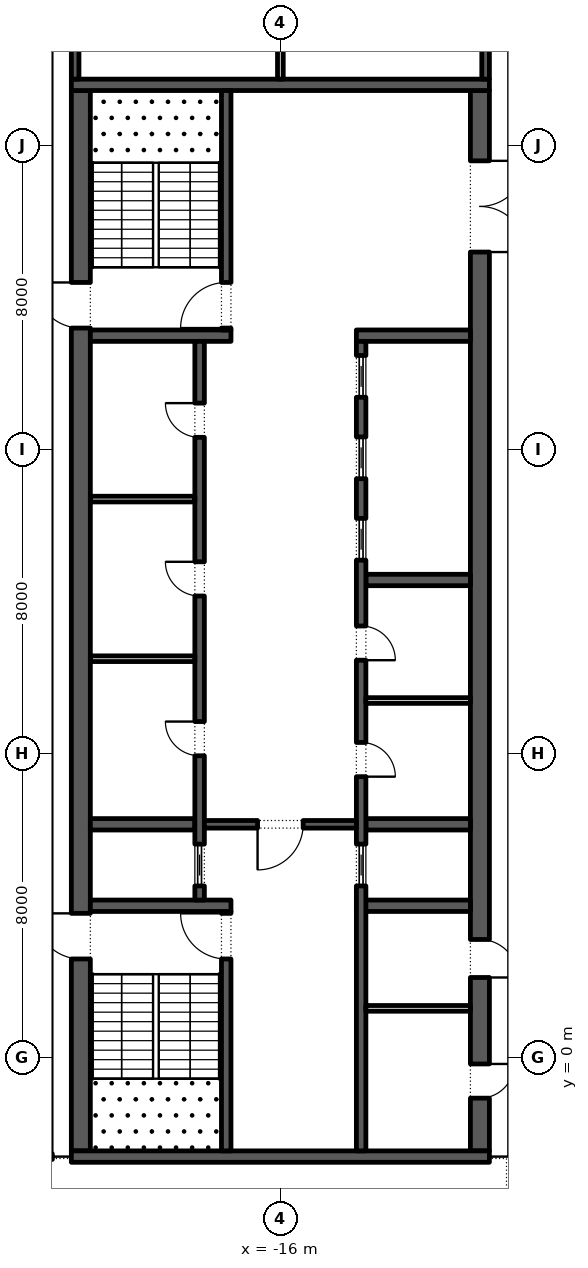
"""IFC4 building model, lengths in metres.
Left out: names, types, materials, properties, quantities, classifications, styles, units other than length and angle.
Written with IfcOpenShell. Run it as: python <this file> out.ifc"""

import sys

from ifc_helpers import new_model, si_unit, direction, frame, frame_2d, origin, place, context, subcontext, project, spatial, rectangle, extrude, element, fill, save


model = new_model("IFC4")
c1 = context("Model", 3, precision=1e-05, world=origin(), true_north=direction((0.0, 1.0)))
c2 = subcontext(c1, "Body", "Model", "MODEL_VIEW")
j1 = project(units=[si_unit("LENGTHUNIT", "METRE"), si_unit("PLANEANGLEUNIT", "RADIAN")], contexts=[c1])
p1 = place(None, origin())
s1 = spatial("IfcSite", under=j1, at=p1, CompositionType="ELEMENT")
p2 = place(p1, origin())
s2 = spatial("IfcBuilding", under=s1, at=p2, CompositionType="ELEMENT")
p3 = place(p2, frame((0.0, 0.0, 325.8)))
s3 = spatial("IfcBuildingStorey", under=s2, at=p3, CompositionType="ELEMENT", Elevation=325.8)
p4 = place(p3, frame((-21.25, -2.45, 0.0), z_axis=(0.0, 0.0, 1.0), x_axis=(0.0, 1.0, 0.0)))
e1 = element("IfcWall", 1, at=p4, inside=s3, PredefinedType="SHEAR", context=c2, shape_type="SweptSolid", body=[
    extrude(rectangle(XDim=27.9, YDim=0.5, at=frame_2d((13.95, 0.0))), origin(), (0.0, 0.0, 1.0), 4.0),
])
p5 = place(p4, frame((5.05, 0.0, 0.0)))
e2 = element("IfcOpeningElement", 2, at=p5, cuts=e1, PredefinedType="OPENING", context=c2, shape_type="SweptSolid", body=[
    extrude(rectangle(XDim=1.2, YDim=2.1, at=frame_2d((0.6, 1.05))), frame((0.0, 0.26, 0.0), z_axis=(0.0, -1.0, 0.0), x_axis=(1.0, 0.0, 0.0)), (0.0, 0.0, 1.0), 0.52),
])
p6 = place(p4, frame((21.65, 0.0, 0.0)))
e3 = element("IfcOpeningElement", 3, at=p6, cuts=e1, PredefinedType="OPENING", context=c2, shape_type="SweptSolid", body=[
    extrude(rectangle(XDim=1.2, YDim=2.1, at=frame_2d((0.6, 1.05))), frame((0.0, 0.26, 0.0), z_axis=(0.0, -1.0, 0.0), x_axis=(1.0, 0.0, 0.0)), (0.0, 0.0, 1.0), 0.52),
])
p7 = place(p3, frame((-10.75, -2.45, 0.0), z_axis=(0.0, 0.0, 1.0), x_axis=(0.0, 1.0, 0.0)))
e4 = element("IfcWall", 4, at=p7, inside=s3, PredefinedType="SHEAR", context=c2, shape_type="SweptSolid", body=[
    extrude(rectangle(XDim=27.9, YDim=0.5, at=frame_2d((13.95, 0.0))), origin(), (0.0, 0.0, 1.0), 4.0),
])
p8 = place(p7, frame((23.65, 0.0, 0.0)))
e5 = element("IfcOpeningElement", 5, at=p8, cuts=e4, PredefinedType="OPENING", context=c2, shape_type="SweptSolid", body=[
    extrude(rectangle(XDim=2.4, YDim=2.1, at=frame_2d((1.2, 1.05))), frame((0.0, 0.26, 0.0), z_axis=(0.0, -1.0, 0.0), x_axis=(1.0, 0.0, 0.0)), (0.0, 0.0, 1.0), 0.52),
])
p9 = place(p7, frame((1.387, 0.0, 0.0)))
e6 = element("IfcOpeningElement", 6, at=p9, cuts=e4, PredefinedType="OPENING", context=c2, shape_type="SweptSolid", body=[
    extrude(rectangle(XDim=0.9, YDim=2.1, at=frame_2d((0.45, 1.05))), frame((0.0, 0.26, 0.0), z_axis=(0.0, -1.0, 0.0), x_axis=(1.0, 0.0, 0.0)), (0.0, 0.0, 1.0), 0.52),
])
p10 = place(p7, frame((4.562, 0.0, 0.0)))
e7 = element("IfcOpeningElement", 7, at=p10, cuts=e4, PredefinedType="OPENING", context=c2, shape_type="SweptSolid", body=[
    extrude(rectangle(XDim=1.0, YDim=2.1, at=frame_2d((0.5, 1.05))), frame((0.0, 0.26, 0.0), z_axis=(0.0, -1.0, 0.0), x_axis=(1.0, 0.0, 0.0)), (0.0, 0.0, 1.0), 0.52),
])
for number, where, z_axis, x_axis in (
    (8, (-21.5, -2.6, 0.0), (0.0, 0.0, 1.0), (1.0, 0.0, 0.0)),
    (9, (-21.5, 25.6, 0.0), (0.0, 0.0, 1.0), (1.0, 0.0, 0.0)),
):
    element("IfcWall", number, at=place(p3, frame(where, z_axis=z_axis, x_axis=x_axis)), inside=s3, PredefinedType="SHEAR", context=c2, shape_type="SweptSolid", body=[
        extrude(rectangle(XDim=11.0, YDim=0.3, at=frame_2d((5.5, 0.0))), origin(), (0.0, 0.0, 1.0), 4.0),
    ])
p11 = place(p3, frame((-21.0, 4.0, 0.0), z_axis=(0.0, 0.0, 1.0), x_axis=(1.0, 0.0, 0.0)))
e10 = element("IfcWall", 10, at=p11, inside=s3, PredefinedType="SHEAR", context=c2, shape_type="SweptSolid", body=[
    extrude(rectangle(XDim=3.7, YDim=0.3, at=frame_2d((1.85, 0.0))), origin(), (0.0, 0.0, 1.0), 4.0),
])
p12 = place(p3, frame((-17.425, -2.45, 0.0), z_axis=(0.0, 0.0, 1.0), x_axis=(0.0, 1.0, 0.0)))
e11 = element("IfcWall", 11, at=p12, inside=s3, PredefinedType="SHEAR", context=c2, shape_type="SweptSolid", body=[
    extrude(rectangle(XDim=6.3, YDim=0.25, at=frame_2d((3.15, 0.0))), origin(), (0.0, 0.0, 1.0), 4.0),
])
p13 = place(p12, frame((5.05, 0.0, 0.0)))
e12 = element("IfcOpeningElement", 12, at=p13, cuts=e11, PredefinedType="OPENING", context=c2, shape_type="SweptSolid", body=[
    extrude(rectangle(XDim=1.2, YDim=2.1, at=frame_2d((0.6, 1.05))), frame((0.0, 0.135, 0.0), z_axis=(0.0, -1.0, 0.0), x_axis=(1.0, 0.0, 0.0)), (0.0, 0.0, 1.0), 0.27),
])
p14 = place(p3, frame((-21.0, 19.0, 0.0), z_axis=(0.0, 0.0, 1.0), x_axis=(1.0, 0.0, 0.0)))
e13 = element("IfcWall", 13, at=p14, inside=s3, PredefinedType="SHEAR", context=c2, shape_type="SweptSolid", body=[
    extrude(rectangle(XDim=3.7, YDim=0.3, at=frame_2d((1.85, 0.0))), origin(), (0.0, 0.0, 1.0), 4.0),
])
p15 = place(p3, frame((-17.425, 19.15, 0.0), z_axis=(0.0, 0.0, 1.0), x_axis=(0.0, 1.0, 0.0)))
e14 = element("IfcWall", 14, at=p15, inside=s3, PredefinedType="SHEAR", context=c2, shape_type="SweptSolid", body=[
    extrude(rectangle(XDim=6.3, YDim=0.25, at=frame_2d((3.15, 0.0))), origin(), (0.0, 0.0, 1.0), 4.0),
])
p16 = place(p15, frame((0.05, 0.0, 0.0)))
e15 = element("IfcOpeningElement", 15, at=p16, cuts=e14, PredefinedType="OPENING", context=c2, shape_type="SweptSolid", body=[
    extrude(rectangle(XDim=1.2, YDim=2.1, at=frame_2d((0.6, 1.05))), frame((0.0, 0.135, 0.0), z_axis=(0.0, -1.0, 0.0), x_axis=(1.0, 0.0, 0.0)), (0.0, 0.0, 1.0), 0.27),
])
p17 = place(p3, frame((-21.0, 6.143, 0.0), z_axis=(0.0, 0.0, 1.0), x_axis=(1.0, 0.0, 0.0)))
e16 = element("IfcWall", 16, at=p17, inside=s3, PredefinedType="SHEAR", context=c2, shape_type="SweptSolid", body=[
    extrude(rectangle(XDim=2.75, YDim=0.3, at=frame_2d((1.375, 0.0))), origin(), (0.0, 0.0, 1.0), 4.0),
])
p18 = place(p3, frame((-18.125, 4.15, 0.0), z_axis=(0.0, 0.0, 1.0), x_axis=(0.0, 1.0, 0.0)))
e17 = element("IfcWall", 17, at=p18, inside=s3, PredefinedType="SHEAR", context=c2, shape_type="SweptSolid", body=[
    extrude(rectangle(XDim=14.7, YDim=0.25, at=frame_2d((7.35, 0.0))), origin(), (0.0, 0.0, 1.0), 4.0),
])
p19 = place(p18, frame((3.796, 0.0, 0.0)))
e18 = element("IfcOpeningElement", 18, at=p19, cuts=e17, PredefinedType="OPENING", context=c2, shape_type="SweptSolid", body=[
    extrude(rectangle(XDim=0.9, YDim=2.1, at=frame_2d((0.45, 1.05))), frame((0.0, 0.135, 0.0), z_axis=(0.0, -1.0, 0.0), x_axis=(1.0, 0.0, 0.0)), (0.0, 0.0, 1.0), 0.27),
])
p20 = place(p18, frame((8.0, 0.0, 0.0)))
e19 = element("IfcOpeningElement", 19, at=p20, cuts=e17, PredefinedType="OPENING", context=c2, shape_type="SweptSolid", body=[
    extrude(rectangle(XDim=0.9, YDim=2.1, at=frame_2d((0.45, 1.05))), frame((0.0, 0.135, 0.0), z_axis=(0.0, -1.0, 0.0), x_axis=(1.0, 0.0, 0.0)), (0.0, 0.0, 1.0), 0.27),
])
p21 = place(p18, frame((12.175, 0.0, 0.0)))
e20 = element("IfcOpeningElement", 20, at=p21, cuts=e17, PredefinedType="OPENING", context=c2, shape_type="SweptSolid", body=[
    extrude(rectangle(XDim=0.9, YDim=2.1, at=frame_2d((0.45, 1.05))), frame((0.0, 0.135, 0.0), z_axis=(0.0, -1.0, 0.0), x_axis=(1.0, 0.0, 0.0)), (0.0, 0.0, 1.0), 0.27),
])
p22 = place(p18, frame((0.371, 0.0, 0.0)))
e21 = element("IfcOpeningElement", 21, at=p22, cuts=e17, PredefinedType="OPENING", context=c2, shape_type="SweptSolid", body=[
    extrude(rectangle(XDim=1.1, YDim=2.1, at=frame_2d((0.55, 1.05))), frame((0.0, 0.135, 0.0), z_axis=(0.0, -1.0, 0.0), x_axis=(1.0, 0.0, 0.0)), (0.0, 0.0, 1.0), 0.27),
])
for number, where, z_axis, x_axis in (
    (22, (-21.0, 10.5, 0.0), (0.0, 0.0, 1.0), (1.0, 0.0, 0.0)),
    (23, (-21.0, 14.7, 0.0), (0.0, 0.0, 1.0), (1.0, 0.0, 0.0)),
):
    element("IfcWall", number, at=place(p3, frame(where, z_axis=z_axis, x_axis=x_axis)), inside=s3, PredefinedType="PARTITIONING", context=c2, shape_type="SweptSolid", body=[
        extrude(rectangle(XDim=2.75, YDim=0.15, at=frame_2d((1.375, 0.0))), origin(), (0.0, 0.0, 1.0), 4.0),
    ])
p23 = place(p3, frame((-14.0, 4.0, 0.0), z_axis=(0.0, 0.0, 1.0), x_axis=(1.0, 0.0, 0.0)))
e24 = element("IfcWall", 24, at=p23, inside=s3, PredefinedType="SHEAR", context=c2, shape_type="SweptSolid", body=[
    extrude(rectangle(XDim=3.0, YDim=0.3, at=frame_2d((1.5, 0.0))), origin(), (0.0, 0.0, 1.0), 4.0),
])
for number, where, z_axis, x_axis in (
    (25, (-13.75, 6.143, 0.0), (0.0, 0.0, 1.0), (1.0, 0.0, 0.0)),
    (26, (-13.75, 12.571, 0.0), (0.0, 0.0, 1.0), (1.0, 0.0, 0.0)),
):
    element("IfcWall", number, at=place(p3, frame(where, z_axis=z_axis, x_axis=x_axis)), inside=s3, PredefinedType="SHEAR", context=c2, shape_type="SweptSolid", body=[
        extrude(rectangle(XDim=2.75, YDim=0.3, at=frame_2d((1.375, 0.0))), origin(), (0.0, 0.0, 1.0), 4.0),
    ])
p24 = place(p3, frame((-14.0, 19.0, 0.0), z_axis=(0.0, 0.0, 1.0), x_axis=(1.0, 0.0, 0.0)))
e27 = element("IfcWall", 27, at=p24, inside=s3, PredefinedType="SHEAR", context=c2, shape_type="SweptSolid", body=[
    extrude(rectangle(XDim=3.0, YDim=0.3, at=frame_2d((1.5, 0.0))), origin(), (0.0, 0.0, 1.0), 4.0),
])
p25 = place(p3, frame((-13.875, -2.45, 0.0), z_axis=(0.0, 0.0, 1.0), x_axis=(0.0, 1.0, 0.0)))
e28 = element("IfcWall", 28, at=p25, inside=s3, PredefinedType="SHEAR", context=c2, shape_type="SweptSolid", body=[
    extrude(rectangle(XDim=21.3, YDim=0.25, at=frame_2d((10.65, 0.0))), origin(), (0.0, 0.0, 1.0), 4.0),
])
p26 = place(p25, frame((9.846, 0.0, 0.0)))
e29 = element("IfcOpeningElement", 29, at=p26, cuts=e28, PredefinedType="OPENING", context=c2, shape_type="SweptSolid", body=[
    extrude(rectangle(XDim=0.9, YDim=2.1, at=frame_2d((0.45, 1.05))), frame((0.0, 0.135, 0.0), z_axis=(0.0, -1.0, 0.0), x_axis=(1.0, 0.0, 0.0)), (0.0, 0.0, 1.0), 0.27),
])
p27 = place(p25, frame((12.911, 0.0, 0.0)))
e30 = element("IfcOpeningElement", 30, at=p27, cuts=e28, PredefinedType="OPENING", context=c2, shape_type="SweptSolid", body=[
    extrude(rectangle(XDim=0.9, YDim=2.1, at=frame_2d((0.45, 1.05))), frame((0.0, 0.135, 0.0), z_axis=(0.0, -1.0, 0.0), x_axis=(1.0, 0.0, 0.0)), (0.0, 0.0, 1.0), 0.27),
])
p28 = place(p25, frame((6.971, 0.0, 0.0)))
e31 = element("IfcOpeningElement", 31, at=p28, cuts=e28, PredefinedType="OPENING", context=c2, shape_type="SweptSolid", body=[
    extrude(rectangle(XDim=1.1, YDim=2.1, at=frame_2d((0.55, 1.05))), frame((0.0, 0.135, 0.0), z_axis=(0.0, -1.0, 0.0), x_axis=(1.0, 0.0, 0.0)), (0.0, 0.0, 1.0), 0.27),
])
p29 = place(p25, frame((15.543, 0.0, 0.0)))
e32 = element("IfcOpeningElement", 32, at=p29, cuts=e28, PredefinedType="OPENING", context=c2, shape_type="SweptSolid", body=[
    extrude(rectangle(XDim=1.1, YDim=2.1, at=frame_2d((0.55, 1.05))), frame((0.0, 0.135, 0.0), z_axis=(0.0, -1.0, 0.0), x_axis=(1.0, 0.0, 0.0)), (0.0, 0.0, 1.0), 0.27),
])
p30 = place(p25, frame((17.686, 0.0, 0.0)))
e33 = element("IfcOpeningElement", 33, at=p30, cuts=e28, PredefinedType="OPENING", context=c2, shape_type="SweptSolid", body=[
    extrude(rectangle(XDim=1.1, YDim=2.1, at=frame_2d((0.55, 1.05))), frame((0.0, 0.135, 0.0), z_axis=(0.0, -1.0, 0.0), x_axis=(1.0, 0.0, 0.0)), (0.0, 0.0, 1.0), 0.27),
])
p31 = place(p25, frame((19.829, 0.0, 0.0)))
e34 = element("IfcOpeningElement", 34, at=p31, cuts=e28, PredefinedType="OPENING", context=c2, shape_type="SweptSolid", body=[
    extrude(rectangle(XDim=1.1, YDim=2.1, at=frame_2d((0.55, 1.05))), frame((0.0, 0.135, 0.0), z_axis=(0.0, -1.0, 0.0), x_axis=(1.0, 0.0, 0.0)), (0.0, 0.0, 1.0), 0.27),
])
p32 = place(p3, frame((-13.75, 9.4, 0.0), z_axis=(0.0, 0.0, 1.0), x_axis=(1.0, 0.0, 0.0)))
e35 = element("IfcWall", 35, at=p32, inside=s3, PredefinedType="PARTITIONING", context=c2, shape_type="SweptSolid", body=[
    extrude(rectangle(XDim=2.75, YDim=0.15, at=frame_2d((1.375, 0.0))), origin(), (0.0, 0.0, 1.0), 4.0),
])
p33 = place(p3, frame((-18.0, 6.143, 0.0), z_axis=(0.0, 0.0, 1.0), x_axis=(1.0, 0.0, 0.0)))
e36 = element("IfcWall", 36, at=p33, inside=s3, PredefinedType="SHEAR", context=c2, shape_type="SweptSolid", body=[
    extrude(rectangle(XDim=4.0, YDim=0.2, at=frame_2d((2.0, 0.0))), origin(), (0.0, 0.0, 1.0), 4.0),
])
p34 = place(p33, frame((1.4, 0.0, 0.0)))
e37 = element("IfcOpeningElement", 37, at=p34, cuts=e36, PredefinedType="OPENING", context=c2, shape_type="SweptSolid", body=[
    extrude(rectangle(XDim=1.2, YDim=2.1, at=frame_2d((0.6, 1.05))), frame((0.0, 0.11, 0.0), z_axis=(0.0, -1.0, 0.0), x_axis=(1.0, 0.0, 0.0)), (0.0, 0.0, 1.0), 0.22),
])
p35 = place(p3, frame((-13.75, 1.3, 0.0), z_axis=(0.0, 0.0, 1.0), x_axis=(1.0, 0.0, 0.0)))
e38 = element("IfcWall", 38, at=p35, inside=s3, PredefinedType="PARTITIONING", context=c2, shape_type="SweptSolid", body=[
    extrude(rectangle(XDim=2.75, YDim=0.15, at=frame_2d((1.375, 0.0))), origin(), (0.0, 0.0, 1.0), 4.0),
])
p36 = place(p3, frame((-21.4, 25.75, 0.0), z_axis=(0.0, 0.0, 1.0), x_axis=(0.0, 1.0, 0.0)))
e39 = element("IfcWall", 39, at=p36, inside=s3, PredefinedType="SHEAR", context=c2, shape_type="SweptSolid", body=[
    extrude(rectangle(XDim=15.05, YDim=0.2, at=frame_2d((7.525, 0.0))), origin(), (0.0, 0.0, 1.0), 4.0),
])
p37 = place(p36, frame((7.075, 0.0, 0.0)))
e40 = element("IfcOpeningElement", 40, at=p37, cuts=e39, PredefinedType="OPENING", context=c2, shape_type="SweptSolid", body=[
    extrude(rectangle(XDim=0.9, YDim=2.1, at=frame_2d((0.45, 1.05))), frame((0.0, 0.11, 0.0), z_axis=(0.0, -1.0, 0.0), x_axis=(1.0, 0.0, 0.0)), (0.0, 0.0, 1.0), 0.22),
])
p38 = place(p3, frame((-10.6, 25.75, 0.0), z_axis=(0.0, 0.0, 1.0), x_axis=(0.0, 1.0, 0.0)))
e41 = element("IfcWall", 41, at=p38, inside=s3, PredefinedType="SHEAR", context=c2, shape_type="SweptSolid", body=[
    extrude(rectangle(XDim=15.05, YDim=0.2, at=frame_2d((7.525, 0.0))), origin(), (0.0, 0.0, 1.0), 4.0),
])
p39 = place(p38, frame((7.075, 0.0, 0.0)))
e42 = element("IfcOpeningElement", 42, at=p39, cuts=e41, PredefinedType="OPENING", context=c2, shape_type="SweptSolid", body=[
    extrude(rectangle(XDim=0.9, YDim=2.1, at=frame_2d((0.45, 1.05))), frame((0.0, 0.11, 0.0), z_axis=(0.0, -1.0, 0.0), x_axis=(1.0, 0.0, 0.0)), (0.0, 0.0, 1.0), 0.22),
])
p40 = place(p3, frame((-16.0, 25.75, 0.0), z_axis=(0.0, 0.0, 1.0), x_axis=(0.0, 1.0, 0.0)))
e43 = element("IfcWall", 43, at=p40, inside=s3, PredefinedType="PARTITIONING", context=c2, shape_type="SweptSolid", body=[
    extrude(rectangle(XDim=15.05, YDim=0.15, at=frame_2d((7.525, 0.0))), origin(), (0.0, 0.0, 1.0), 4.0),
])
p41 = place(p19, origin())
e44 = element("IfcDoor", 44, at=p41, inside=s3, OperationType="SINGLE_SWING_LEFT", PredefinedType="DOOR", context=c2, shape_type="SweptSolid", body=[
    extrude(rectangle(XDim=0.9, YDim=2.1, at=frame_2d((0.45, 1.05))), frame((0.0, 0.125, 0.0), z_axis=(0.0, -1.0, 0.0), x_axis=(1.0, 0.0, 0.0)), (0.0, 0.0, 1.0), 0.05),
])
fill(e18, e44)
p42 = place(p20, origin())
e45 = element("IfcDoor", 45, at=p42, inside=s3, OperationType="SINGLE_SWING_LEFT", PredefinedType="DOOR", context=c2, shape_type="SweptSolid", body=[
    extrude(rectangle(XDim=0.9, YDim=2.1, at=frame_2d((0.45, 1.05))), frame((0.0, 0.125, 0.0), z_axis=(0.0, -1.0, 0.0), x_axis=(1.0, 0.0, 0.0)), (0.0, 0.0, 1.0), 0.05),
])
fill(e19, e45)
p43 = place(p21, origin())
e46 = element("IfcDoor", 46, at=p43, inside=s3, OperationType="SINGLE_SWING_LEFT", PredefinedType="DOOR", context=c2, shape_type="SweptSolid", body=[
    extrude(rectangle(XDim=0.9, YDim=2.1, at=frame_2d((0.45, 1.05))), frame((0.0, 0.125, 0.0), z_axis=(0.0, -1.0, 0.0), x_axis=(1.0, 0.0, 0.0)), (0.0, 0.0, 1.0), 0.05),
])
fill(e20, e46)
p44 = place(p22, origin())
e47 = element("IfcDoor", 47, at=p44, inside=s3, OperationType="SLIDING_TO_LEFT", PredefinedType="DOOR", context=c2, shape_type="SweptSolid", body=[
    extrude(rectangle(XDim=1.1, YDim=2.1, at=frame_2d((0.55, 1.05))), frame((0.0, 0.025, 0.0), z_axis=(0.0, -1.0, 0.0), x_axis=(1.0, 0.0, 0.0)), (0.0, 0.0, 1.0), 0.05),
])
fill(e21, e47)
p45 = place(p26, frame((0.9, -0.2, 0.0), z_axis=(0.0, 0.0, 1.0), x_axis=(-1.0, 0.0, 0.0)))
e48 = element("IfcDoor", 48, at=p45, inside=s3, OperationType="SINGLE_SWING_LEFT", PredefinedType="DOOR", context=c2, shape_type="SweptSolid", body=[
    extrude(rectangle(XDim=0.9, YDim=2.1, at=frame_2d((0.45, 1.05))), frame((0.0, -0.075, 0.0), z_axis=(0.0, -1.0, 0.0), x_axis=(1.0, 0.0, 0.0)), (0.0, 0.0, 1.0), 0.05),
])
fill(e29, e48)
p46 = place(p27, frame((0.9, -0.2, 0.0), z_axis=(0.0, 0.0, 1.0), x_axis=(-1.0, 0.0, 0.0)))
e49 = element("IfcDoor", 49, at=p46, inside=s3, OperationType="SINGLE_SWING_LEFT", PredefinedType="DOOR", context=c2, shape_type="SweptSolid", body=[
    extrude(rectangle(XDim=0.9, YDim=2.1, at=frame_2d((0.45, 1.05))), frame((0.0, -0.075, 0.0), z_axis=(0.0, -1.0, 0.0), x_axis=(1.0, 0.0, 0.0)), (0.0, 0.0, 1.0), 0.05),
])
fill(e30, e49)
p47 = place(p28, origin())
e50 = element("IfcDoor", 50, at=p47, inside=s3, OperationType="SLIDING_TO_LEFT", PredefinedType="DOOR", context=c2, shape_type="SweptSolid", body=[
    extrude(rectangle(XDim=1.1, YDim=2.1, at=frame_2d((0.55, 1.05))), frame((0.0, 0.025, 0.0), z_axis=(0.0, -1.0, 0.0), x_axis=(1.0, 0.0, 0.0)), (0.0, 0.0, 1.0), 0.05),
])
fill(e31, e50)
p48 = place(p29, origin())
e51 = element("IfcDoor", 51, at=p48, inside=s3, OperationType="SLIDING_TO_LEFT", PredefinedType="DOOR", context=c2, shape_type="SweptSolid", body=[
    extrude(rectangle(XDim=1.1, YDim=2.1, at=frame_2d((0.55, 1.05))), frame((0.0, 0.025, 0.0), z_axis=(0.0, -1.0, 0.0), x_axis=(1.0, 0.0, 0.0)), (0.0, 0.0, 1.0), 0.05),
])
fill(e32, e51)
p49 = place(p30, origin())
e52 = element("IfcDoor", 52, at=p49, inside=s3, OperationType="SLIDING_TO_LEFT", PredefinedType="DOOR", context=c2, shape_type="SweptSolid", body=[
    extrude(rectangle(XDim=1.1, YDim=2.1, at=frame_2d((0.55, 1.05))), frame((0.0, 0.025, 0.0), z_axis=(0.0, -1.0, 0.0), x_axis=(1.0, 0.0, 0.0)), (0.0, 0.0, 1.0), 0.05),
])
fill(e33, e52)
p50 = place(p31, origin())
e53 = element("IfcDoor", 53, at=p50, inside=s3, OperationType="SLIDING_TO_LEFT", PredefinedType="DOOR", context=c2, shape_type="SweptSolid", body=[
    extrude(rectangle(XDim=1.1, YDim=2.1, at=frame_2d((0.55, 1.05))), frame((0.0, 0.025, 0.0), z_axis=(0.0, -1.0, 0.0), x_axis=(1.0, 0.0, 0.0)), (0.0, 0.0, 1.0), 0.05),
])
fill(e34, e53)
p51 = place(p34, frame((1.2, 0.0, 0.0), z_axis=(0.0, 0.0, 1.0), x_axis=(-1.0, 0.0, 0.0)))
e54 = element("IfcDoor", 54, at=p51, inside=s3, OperationType="SINGLE_SWING_LEFT", PredefinedType="DOOR", context=c2, shape_type="SweptSolid", body=[
    extrude(rectangle(XDim=1.2, YDim=2.1, at=frame_2d((0.6, 1.05))), frame((0.0, 0.025, 0.0), z_axis=(0.0, -1.0, 0.0), x_axis=(1.0, 0.0, 0.0)), (0.0, 0.0, 1.0), 0.05),
])
fill(e37, e54)
p52 = place(p8, frame((2.4, 0.0, 0.0), z_axis=(0.0, 0.0, 1.0), x_axis=(-1.0, 0.0, 0.0)))
e55 = element("IfcDoor", 55, at=p52, inside=s3, OperationType="DOUBLE_DOOR_SINGLE_SWING", PredefinedType="DOOR", context=c2, shape_type="SweptSolid", body=[
    extrude(rectangle(XDim=2.4, YDim=2.1, at=frame_2d((1.2, 1.05))), frame((0.0, 0.025, 0.0), z_axis=(0.0, -1.0, 0.0), x_axis=(1.0, 0.0, 0.0)), (0.0, 0.0, 1.0), 0.05),
])
fill(e5, e55)
p53 = place(p13, origin())
e56 = element("IfcDoor", 56, at=p53, inside=s3, OperationType="SINGLE_SWING_LEFT", PredefinedType="DOOR", context=c2, shape_type="SweptSolid", body=[
    extrude(rectangle(XDim=1.2, YDim=2.1, at=frame_2d((0.6, 1.05))), frame((0.0, 0.025, 0.0), z_axis=(0.0, -1.0, 0.0), x_axis=(1.0, 0.0, 0.0)), (0.0, 0.0, 1.0), 0.05),
])
fill(e12, e56)
p54 = place(p5, origin())
e57 = element("IfcDoor", 57, at=p54, inside=s3, OperationType="SINGLE_SWING_LEFT", PredefinedType="DOOR", context=c2, shape_type="SweptSolid", body=[
    extrude(rectangle(XDim=1.2, YDim=2.1, at=frame_2d((0.6, 1.05))), frame((0.0, 0.025, 0.0), z_axis=(0.0, -1.0, 0.0), x_axis=(1.0, 0.0, 0.0)), (0.0, 0.0, 1.0), 0.05),
])
fill(e2, e57)
p55 = place(p16, origin())
e58 = element("IfcDoor", 58, at=p55, inside=s3, OperationType="SINGLE_SWING_RIGHT", PredefinedType="DOOR", context=c2, shape_type="SweptSolid", body=[
    extrude(rectangle(XDim=1.2, YDim=2.1, at=frame_2d((0.6, 1.05))), frame((0.0, 0.025, 0.0), z_axis=(0.0, -1.0, 0.0), x_axis=(1.0, 0.0, 0.0)), (0.0, 0.0, 1.0), 0.05),
])
fill(e15, e58)
p56 = place(p6, origin())
e59 = element("IfcDoor", 59, at=p56, inside=s3, OperationType="SINGLE_SWING_LEFT", PredefinedType="DOOR", context=c2, shape_type="SweptSolid", body=[
    extrude(rectangle(XDim=1.2, YDim=2.1, at=frame_2d((0.6, 1.05))), frame((0.0, 0.025, 0.0), z_axis=(0.0, -1.0, 0.0), x_axis=(1.0, 0.0, 0.0)), (0.0, 0.0, 1.0), 0.05),
])
fill(e3, e59)
p57 = place(p9, frame((0.9, 0.45, 0.0), z_axis=(0.0, 0.0, 1.0), x_axis=(-1.0, 0.0, 0.0)))
e60 = element("IfcDoor", 60, at=p57, inside=s3, OperationType="SINGLE_SWING_RIGHT", PredefinedType="DOOR", context=c2, shape_type="SweptSolid", body=[
    extrude(rectangle(XDim=0.9, YDim=2.1, at=frame_2d((0.45, 1.05))), frame((0.0, 0.25, 0.0), z_axis=(0.0, -1.0, 0.0), x_axis=(1.0, 0.0, 0.0)), (0.0, 0.0, 1.0), 0.05),
])
fill(e6, e60)
p58 = place(p10, frame((1.0, 0.45, 0.0), z_axis=(0.0, 0.0, 1.0), x_axis=(-1.0, 0.0, 0.0)))
e61 = element("IfcDoor", 61, at=p58, inside=s3, OperationType="SINGLE_SWING_LEFT", PredefinedType="DOOR", context=c2, shape_type="SweptSolid", body=[
    extrude(rectangle(XDim=1.0, YDim=2.1, at=frame_2d((0.5, 1.05))), frame((0.0, 0.25, 0.0), z_axis=(0.0, -1.0, 0.0), x_axis=(1.0, 0.0, 0.0)), (0.0, 0.0, 1.0), 0.05),
])
fill(e7, e61)
save(model, sys.argv[1])
